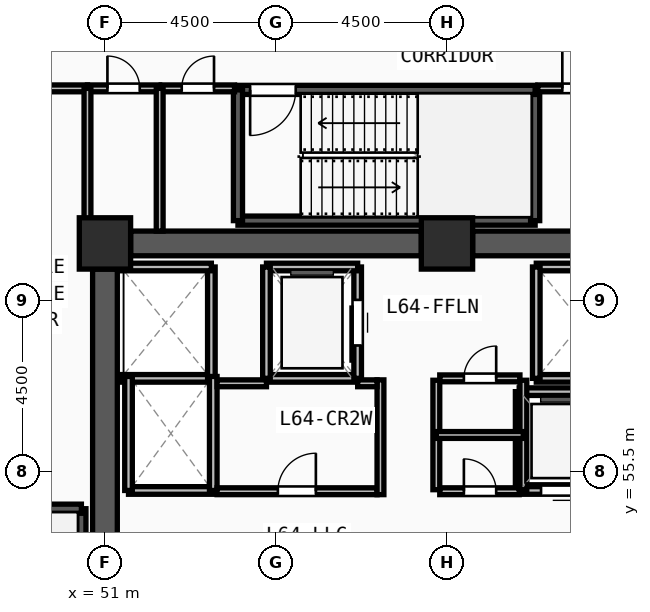
"""IFC4 building model, lengths in metres.
Left out: names, types, materials, properties, quantities, classifications, styles, units other than length and angle.
Written with IfcOpenShell. Run it as: python <this file> out.ifc"""

import sys

from ifc_helpers import new_model, si_unit, direction, frame, frame_2d, origin, origin_2d, place, context, subcontext, project, spatial, rectangle, extrude, source, transform, mapped, element, fill, save


model = new_model("IFC4")
c1 = context("Model", 3, precision=1e-05, world=origin(), true_north=direction((0.0, 1.0)))
c2 = subcontext(c1, "Body", "Model", "MODEL_VIEW")
j1 = project(units=[si_unit("LENGTHUNIT", "METRE"), si_unit("PLANEANGLEUNIT", "RADIAN")], contexts=[c1])
p1 = place(None, origin())
s1 = spatial("IfcSite", under=j1, at=p1, CompositionType="ELEMENT")
p2 = place(p1, origin())
s2 = spatial("IfcBuilding", under=s1, at=p2, CompositionType="ELEMENT")
p3 = place(p2, frame((0.0, 0.0, 247.5)))
s3 = spatial("IfcBuildingStorey", under=s2, at=p3, CompositionType="ELEMENT", Elevation=247.5)
m1 = source(origin(), c2, "Body", "SweptSolid", [
    extrude(rectangle(XDim=1.35, YDim=1.35, at=origin_2d()), origin(), (0.0, 0.0, 1.0), 3.75),
])
for number, where, z_axis, x_axis in (
    (1, (60.0, 61.5, 0.0), (0.0, 0.0, 1.0), (1.0, 0.0, 0.0)),
    (2, (51.0, 61.5, 0.0), (0.0, 0.0, 1.0), (1.0, 0.0, 0.0)),
):
    element("IfcColumn", number, at=place(p3, frame(where, z_axis=z_axis, x_axis=x_axis)), inside=s3, PredefinedType="COLUMN", context=c2, shape_type="MappedRepresentation", body=[
        mapped(m1, transform((0.0, 0.0, 0.0), x_axis=(1.0, 0.0, 0.0), y_axis=(0.0, 1.0, 0.0), z_axis=(0.0, 0.0, 1.0), scale=1.0)),
    ])
for number, where, z_axis, x_axis in (
    (3, (51.675, 61.5, 0.0), (0.0, 0.0, 1.0), (1.0, 0.0, 0.0)),
    (4, (60.675, 61.5, 0.0), (0.0, 0.0, 1.0), (1.0, 0.0, 0.0)),
):
    element("IfcWall", number, at=place(p3, frame(where, z_axis=z_axis, x_axis=x_axis)), inside=s3, PredefinedType="SHEAR", context=c2, shape_type="SweptSolid", body=[
        extrude(rectangle(XDim=7.65, YDim=0.65, at=frame_2d((3.825, 0.0))), origin(), (0.0, 0.0, 1.0), 3.57),
    ])
p4 = place(p3, frame((51.0, 47.175, 0.0), z_axis=(0.0, 0.0, 1.0), x_axis=(0.0, 1.0, 0.0)))
e5 = element("IfcWall", 5, at=p4, inside=s3, PredefinedType="SHEAR", context=c2, shape_type="SweptSolid", body=[
    extrude(rectangle(XDim=13.65, YDim=0.65, at=frame_2d((6.825, 0.0))), origin(), (0.0, 0.0, 1.0), 3.57),
])
p5 = place(p3, frame((50.38, 46.7, 0.0), z_axis=(0.0, 0.0, 1.0), x_axis=(0.0, 1.0, 0.0)))
e6 = element("IfcWall", 6, at=p5, inside=s3, PredefinedType="SOLIDWALL", context=c2, shape_type="SweptSolid", body=[
    extrude(rectangle(XDim=7.82, YDim=0.24, at=frame_2d((3.91, 0.0))), origin(), (0.0, 0.0, 1.0), 3.57),
])
p6 = place(p3, frame((50.38, 54.52, 0.0), z_axis=(0.0, 0.0, 1.0), x_axis=(-1.0, 0.0, 0.0)))
e7 = element("IfcWall", 7, at=p6, inside=s3, PredefinedType="SOLIDWALL", context=c2, shape_type="SweptSolid", body=[
    extrude(rectangle(XDim=3.44, YDim=0.24, at=frame_2d((1.72, 0.0))), origin(), (0.0, 0.0, 1.0), 3.57),
])
p7 = place(p3, frame((54.5, 62.1, 0.0), z_axis=(0.0, 0.0, 1.0), x_axis=(1.0, 0.0, 0.0)))
e8 = element("IfcWall", 8, at=p7, inside=s3, PredefinedType="SOLIDWALL", context=c2, shape_type="SweptSolid", body=[
    extrude(rectangle(XDim=7.82, YDim=0.24, at=frame_2d((3.91, 0.0))), origin(), (0.0, 0.0, 1.0), 3.57),
])
p8 = place(p3, frame((62.32, 62.1, 0.0), z_axis=(0.0, 0.0, 1.0), x_axis=(0.0, 1.0, 0.0)))
e9 = element("IfcWall", 9, at=p8, inside=s3, PredefinedType="SOLIDWALL", context=c2, shape_type="SweptSolid", body=[
    extrude(rectangle(XDim=3.44, YDim=0.24, at=frame_2d((1.72, 0.0))), origin(), (0.0, 0.0, 1.0), 3.57),
])
p9 = place(p3, frame((62.32, 65.54, 0.0), z_axis=(0.0, 0.0, 1.0), x_axis=(-1.0, 0.0, 0.0)))
e10 = element("IfcWall", 10, at=p9, inside=s3, PredefinedType="SOLIDWALL", context=c2, shape_type="SweptSolid", body=[
    extrude(rectangle(XDim=7.82, YDim=0.24, at=frame_2d((3.91, 0.0))), origin(), (0.0, 0.0, 1.0), 3.57),
])
m2 = source(origin(), c2, "Body", "SweptSolid", [
    extrude(rectangle(XDim=1.2, YDim=2.2, at=frame_2d((0.6, 1.1))), frame((0.0, 0.13, 0.0), z_axis=(0.0, -1.0, 0.0), x_axis=(1.0, 0.0, 0.0)), (0.0, 0.0, 1.0), 0.26),
])
p10 = place(p9, frame((6.3, 0.0, 0.0)))
e11 = element("IfcOpeningElement", 11, at=p10, cuts=e10, PredefinedType="OPENING", context=c2, shape_type="MappedRepresentation", body=[
    mapped(m2, transform((0.0, 0.0, 0.0), x_axis=(1.0, 0.0, 0.0), y_axis=(0.0, 1.0, 0.0), z_axis=(0.0, 0.0, 1.0), scale=1.0)),
])
p11 = place(p3, frame((54.5, 65.54, 0.0), z_axis=(0.0, 0.0, 1.0), x_axis=(0.0, -1.0, 0.0)))
e12 = element("IfcWall", 12, at=p11, inside=s3, PredefinedType="SOLIDWALL", context=c2, shape_type="SweptSolid", body=[
    extrude(rectangle(XDim=3.44, YDim=0.24, at=frame_2d((1.72, 0.0))), origin(), (0.0, 0.0, 1.0), 3.57),
])
p12 = place(p3, frame((55.25, 57.95, 0.0), z_axis=(0.0, 0.0, 1.0), x_axis=(1.0, 0.0, 0.0)))
e13 = element("IfcWall", 13, at=p12, inside=s3, PredefinedType="SOLIDWALL", context=c2, shape_type="SweptSolid", body=[
    extrude(rectangle(XDim=2.4, YDim=0.2, at=frame_2d((1.2, 0.0))), origin(), (0.0, 0.0, 1.0), 3.57),
])
p13 = place(p3, frame((57.65, 57.95, 0.0), z_axis=(0.0, 0.0, 1.0), x_axis=(0.0, 1.0, 0.0)))
e14 = element("IfcWall", 14, at=p13, inside=s3, PredefinedType="SOLIDWALL", context=c2, shape_type="SweptSolid", body=[
    extrude(rectangle(XDim=2.93, YDim=0.2, at=frame_2d((1.465, 0.0))), origin(), (0.0, 0.0, 1.0), 3.57),
])
m3 = source(origin(), c2, "Body", "SweptSolid", [
    extrude(rectangle(XDim=1.2, YDim=2.3, at=frame_2d((0.6, 1.15))), frame((0.0, 0.11, 0.0), z_axis=(0.0, -1.0, 0.0), x_axis=(1.0, 0.0, 0.0)), (0.0, 0.0, 1.0), 0.22),
])
p14 = place(p13, frame((0.865, 0.0, 0.0)))
e15 = element("IfcOpeningElement", 15, at=p14, cuts=e14, PredefinedType="OPENING", context=c2, shape_type="MappedRepresentation", body=[
    mapped(m3, transform((0.0, 0.0, 0.0), x_axis=(1.0, 0.0, 0.0), y_axis=(0.0, 1.0, 0.0), z_axis=(0.0, 0.0, 1.0), scale=1.0)),
])
p15 = place(p3, frame((57.65, 60.88, 0.0), z_axis=(0.0, 0.0, 1.0), x_axis=(-1.0, 0.0, 0.0)))
e16 = element("IfcWall", 16, at=p15, inside=s3, PredefinedType="SOLIDWALL", context=c2, shape_type="SweptSolid", body=[
    extrude(rectangle(XDim=2.4, YDim=0.2, at=frame_2d((1.2, 0.0))), origin(), (0.0, 0.0, 1.0), 3.57),
])
p16 = place(p3, frame((55.25, 60.88, 0.0), z_axis=(0.0, 0.0, 1.0), x_axis=(0.0, -1.0, 0.0)))
e17 = element("IfcWall", 17, at=p16, inside=s3, PredefinedType="SOLIDWALL", context=c2, shape_type="SweptSolid", body=[
    extrude(rectangle(XDim=2.93, YDim=0.2, at=frame_2d((1.465, 0.0))), origin(), (0.0, 0.0, 1.0), 3.57),
])
for number, where, z_axis, x_axis in (
    (18, (62.35, 57.95, 0.0), (0.0, 0.0, 1.0), (1.0, 0.0, 0.0)),
    (19, (64.75, 60.88, 0.0), (0.0, 0.0, 1.0), (-1.0, 0.0, 0.0)),
):
    element("IfcWall", number, at=place(p3, frame(where, z_axis=z_axis, x_axis=x_axis)), inside=s3, PredefinedType="SOLIDWALL", context=c2, shape_type="SweptSolid", body=[
        extrude(rectangle(XDim=2.4, YDim=0.2, at=frame_2d((1.2, 0.0))), origin(), (0.0, 0.0, 1.0), 3.57),
    ])
p17 = place(p3, frame((62.35, 60.88, 0.0), z_axis=(0.0, 0.0, 1.0), x_axis=(0.0, -1.0, 0.0)))
e20 = element("IfcWall", 20, at=p17, inside=s3, PredefinedType="SOLIDWALL", context=c2, shape_type="SweptSolid", body=[
    extrude(rectangle(XDim=2.93, YDim=0.2, at=frame_2d((1.465, 0.0))), origin(), (0.0, 0.0, 1.0), 3.57),
])
p18 = place(p3, frame((51.4, 57.95, 0.0), z_axis=(0.0, 0.0, 1.0), x_axis=(1.0, 0.0, 0.0)))
e21 = element("IfcWall", 21, at=p18, inside=s3, PredefinedType="SOLIDWALL", context=c2, shape_type="SweptSolid", body=[
    extrude(rectangle(XDim=2.4, YDim=0.2, at=frame_2d((1.2, 0.0))), origin(), (0.0, 0.0, 1.0), 3.57),
])
p19 = place(p3, frame((53.8, 57.95, 0.0), z_axis=(0.0, 0.0, 1.0), x_axis=(0.0, 1.0, 0.0)))
e22 = element("IfcWall", 22, at=p19, inside=s3, PredefinedType="SOLIDWALL", context=c2, shape_type="SweptSolid", body=[
    extrude(rectangle(XDim=2.93, YDim=0.2, at=frame_2d((1.465, 0.0))), origin(), (0.0, 0.0, 1.0), 3.57),
])
p20 = place(p3, frame((53.8, 60.88, 0.0), z_axis=(0.0, 0.0, 1.0), x_axis=(-1.0, 0.0, 0.0)))
e23 = element("IfcWall", 23, at=p20, inside=s3, PredefinedType="SOLIDWALL", context=c2, shape_type="SweptSolid", body=[
    extrude(rectangle(XDim=2.4, YDim=0.2, at=frame_2d((1.2, 0.0))), origin(), (0.0, 0.0, 1.0), 3.57),
])
p21 = place(p3, frame((51.62, 55.0, 0.0), z_axis=(0.0, 0.0, 1.0), x_axis=(1.0, 0.0, 0.0)))
e24 = element("IfcWall", 24, at=p21, inside=s3, PredefinedType="SOLIDWALL", context=c2, shape_type="SweptSolid", body=[
    extrude(rectangle(XDim=2.23, YDim=0.2, at=frame_2d((1.115, 0.0))), origin(), (0.0, 0.0, 1.0), 3.57),
])
for number, where, z_axis, x_axis in (
    (25, (53.85, 55.0, 0.0), (0.0, 0.0, 1.0), (0.0, 1.0, 0.0)),
    (26, (51.62, 58.0, 0.0), (0.0, 0.0, 1.0), (0.0, -1.0, 0.0)),
):
    element("IfcWall", number, at=place(p3, frame(where, z_axis=z_axis, x_axis=x_axis)), inside=s3, PredefinedType="SOLIDWALL", context=c2, shape_type="SweptSolid", body=[
        extrude(rectangle(XDim=3.0, YDim=0.2, at=frame_2d((1.5, 0.0))), origin(), (0.0, 0.0, 1.0), 3.57),
    ])
p22 = place(p3, frame((61.9, 55.0, 0.0), z_axis=(0.0, 0.0, 1.0), x_axis=(1.0, 0.0, 0.0)))
e27 = element("IfcWall", 27, at=p22, inside=s3, PredefinedType="SOLIDWALL", context=c2, shape_type="SweptSolid", body=[
    extrude(rectangle(XDim=2.25, YDim=0.2, at=frame_2d((1.125, 0.0))), origin(), (0.0, 0.0, 1.0), 3.57),
])
m4 = source(origin(), c2, "Body", "SweptSolid", [
    extrude(rectangle(XDim=1.1, YDim=2.2, at=frame_2d((0.55, 1.1))), frame((0.0, 0.11, 0.0), z_axis=(0.0, -1.0, 0.0), x_axis=(1.0, 0.0, 0.0)), (0.0, 0.0, 1.0), 0.22),
])
p23 = place(p22, frame((0.575, 0.0, 0.0)))
e28 = element("IfcOpeningElement", 28, at=p23, cuts=e27, PredefinedType="OPENING", context=c2, shape_type="MappedRepresentation", body=[
    mapped(m4, transform((0.0, 0.0, 0.0), x_axis=(1.0, 0.0, 0.0), y_axis=(0.0, 1.0, 0.0), z_axis=(0.0, 0.0, 1.0), scale=1.0)),
])
p24 = place(p3, frame((64.15, 57.6, 0.0), z_axis=(0.0, 0.0, 1.0), x_axis=(-1.0, 0.0, 0.0)))
e29 = element("IfcWall", 29, at=p24, inside=s3, PredefinedType="SOLIDWALL", context=c2, shape_type="SweptSolid", body=[
    extrude(rectangle(XDim=2.25, YDim=0.2, at=frame_2d((1.125, 0.0))), origin(), (0.0, 0.0, 1.0), 3.57),
])
p25 = place(p3, frame((61.9, 57.6, 0.0), z_axis=(0.0, 0.0, 1.0), x_axis=(0.0, -1.0, 0.0)))
e30 = element("IfcWall", 30, at=p25, inside=s3, PredefinedType="SOLIDWALL", context=c2, shape_type="SweptSolid", body=[
    extrude(rectangle(XDim=2.6, YDim=0.2, at=frame_2d((1.3, 0.0))), origin(), (0.0, 0.0, 1.0), 3.57),
])
p26 = place(p3, frame((53.95, 54.98, 0.0), z_axis=(0.0, 0.0, 1.0), x_axis=(1.0, 0.0, 0.0)))
e31 = element("IfcWall", 31, at=p26, inside=s3, PredefinedType="PARTITIONING", context=c2, shape_type="SweptSolid", body=[
    extrude(rectangle(XDim=4.21, YDim=0.18, at=frame_2d((2.105, 0.0))), origin(), (0.0, 0.0, 1.0), 3.57),
])
m5 = source(origin(), c2, "Body", "SweptSolid", [
    extrude(rectangle(XDim=1.0, YDim=2.2, at=frame_2d((0.5, 1.1))), frame((0.0, 0.1, 0.0), z_axis=(0.0, -1.0, 0.0), x_axis=(1.0, 0.0, 0.0)), (0.0, 0.0, 1.0), 0.2),
])
p27 = place(p26, frame((1.6, 0.0, 0.0)))
e32 = element("IfcOpeningElement", 32, at=p27, cuts=e31, PredefinedType="OPENING", context=c2, shape_type="MappedRepresentation", body=[
    mapped(m5, transform((0.0, 0.0, 0.0), x_axis=(1.0, 0.0, 0.0), y_axis=(0.0, 1.0, 0.0), z_axis=(0.0, 0.0, 1.0), scale=1.0)),
])
p28 = place(p3, frame((59.81, 54.98, 0.0), z_axis=(0.0, 0.0, 1.0), x_axis=(1.0, 0.0, 0.0)))
e33 = element("IfcWall", 33, at=p28, inside=s3, PredefinedType="PARTITIONING", context=c2, shape_type="SweptSolid", body=[
    extrude(rectangle(XDim=2.09, YDim=0.18, at=frame_2d((1.045, 0.0))), origin(), (0.0, 0.0, 1.0), 3.57),
])
m6 = source(origin(), c2, "Body", "SweptSolid", [
    extrude(rectangle(XDim=0.85, YDim=2.1, at=frame_2d((0.425, 1.05))), frame((0.0, 0.1, 0.0), z_axis=(0.0, -1.0, 0.0), x_axis=(1.0, 0.0, 0.0)), (0.0, 0.0, 1.0), 0.2),
])
p29 = place(p28, frame((0.635, 0.0, 0.0)))
e34 = element("IfcOpeningElement", 34, at=p29, cuts=e33, PredefinedType="OPENING", context=c2, shape_type="MappedRepresentation", body=[
    mapped(m6, transform((0.0, 0.0, 0.0), x_axis=(1.0, 0.0, 0.0), y_axis=(0.0, 1.0, 0.0), z_axis=(0.0, 0.0, 1.0), scale=1.0)),
])
p30 = place(p3, frame((59.81, 57.95, 0.0), z_axis=(0.0, 0.0, 1.0), x_axis=(1.0, 0.0, 0.0)))
e35 = element("IfcWall", 35, at=p30, inside=s3, PredefinedType="PARTITIONING", context=c2, shape_type="SweptSolid", body=[
    extrude(rectangle(XDim=2.11, YDim=0.18, at=frame_2d((1.055, 0.0))), origin(), (0.0, 0.0, 1.0), 3.57),
])
p31 = place(p30, frame((0.635, 0.0, 0.0)))
e36 = element("IfcOpeningElement", 36, at=p31, cuts=e35, PredefinedType="OPENING", context=c2, shape_type="MappedRepresentation", body=[
    mapped(m6, transform((0.0, 0.0, 0.0), x_axis=(1.0, 0.0, 0.0), y_axis=(0.0, 1.0, 0.0), z_axis=(0.0, 0.0, 1.0), scale=1.0)),
])
p32 = place(p3, frame((50.54, 65.58, 0.0), z_axis=(0.0, 0.0, 1.0), x_axis=(1.0, 0.0, 0.0)))
e37 = element("IfcWall", 37, at=p32, inside=s3, PredefinedType="PARTITIONING", context=c2, shape_type="SweptSolid", body=[
    extrude(rectangle(XDim=1.9, YDim=0.18, at=frame_2d((0.95, 0.0))), origin(), (0.0, 0.0, 1.0), 3.57),
])
p33 = place(p32, frame((0.525, 0.0, 0.0)))
e38 = element("IfcOpeningElement", 38, at=p33, cuts=e37, PredefinedType="OPENING", context=c2, shape_type="MappedRepresentation", body=[
    mapped(m6, transform((0.0, 0.0, 0.0), x_axis=(1.0, 0.0, 0.0), y_axis=(0.0, 1.0, 0.0), z_axis=(0.0, 0.0, 1.0), scale=1.0)),
])
p34 = place(p3, frame((52.48, 65.58, 0.0), z_axis=(0.0, 0.0, 1.0), x_axis=(1.0, 0.0, 0.0)))
e39 = element("IfcWall", 39, at=p34, inside=s3, PredefinedType="PARTITIONING", context=c2, shape_type="SweptSolid", body=[
    extrude(rectangle(XDim=1.93, YDim=0.18, at=frame_2d((0.965, 0.0))), origin(), (0.0, 0.0, 1.0), 3.57),
])
p35 = place(p34, frame((0.54, 0.0, 0.0)))
e40 = element("IfcOpeningElement", 40, at=p35, cuts=e39, PredefinedType="OPENING", context=c2, shape_type="MappedRepresentation", body=[
    mapped(m6, transform((0.0, 0.0, 0.0), x_axis=(1.0, 0.0, 0.0), y_axis=(0.0, 1.0, 0.0), z_axis=(0.0, 0.0, 1.0), scale=1.0)),
])
p36 = place(p3, frame((62.39, 65.58, 0.0), z_axis=(0.0, 0.0, 1.0), x_axis=(1.0, 0.0, 0.0)))
e41 = element("IfcWall", 41, at=p36, inside=s3, PredefinedType="PARTITIONING", context=c2, shape_type="SweptSolid", body=[
    extrude(rectangle(XDim=2.29, YDim=0.18, at=frame_2d((1.145, 0.0))), origin(), (0.0, 0.0, 1.0), 3.57),
])
p37 = place(p36, frame((0.645, 0.0, 0.0)))
e42 = element("IfcOpeningElement", 42, at=p37, cuts=e41, PredefinedType="OPENING", context=c2, shape_type="MappedRepresentation", body=[
    mapped(m5, transform((0.0, 0.0, 0.0), x_axis=(1.0, 0.0, 0.0), y_axis=(0.0, 1.0, 0.0), z_axis=(0.0, 0.0, 1.0), scale=1.0)),
])
p38 = place(p3, frame((46.7, 65.58, 0.0), z_axis=(0.0, 0.0, 1.0), x_axis=(1.0, 0.0, 0.0)))
e43 = element("IfcWall", 43, at=p38, inside=s3, PredefinedType="PARTITIONING", context=c2, shape_type="SweptSolid", body=[
    extrude(rectangle(XDim=3.84, YDim=0.18, at=frame_2d((1.92, 0.0))), origin(), (0.0, 0.0, 1.0), 3.57),
])
m7 = source(origin(), c2, "Body", "SweptSolid", [
    extrude(rectangle(XDim=1.3, YDim=2.2, at=frame_2d((0.65, 1.1))), frame((0.0, 0.1, 0.0), z_axis=(0.0, -1.0, 0.0), x_axis=(1.0, 0.0, 0.0)), (0.0, 0.0, 1.0), 0.2),
])
p39 = place(p38, frame((1.27, 0.0, 0.0)))
e44 = element("IfcOpeningElement", 44, at=p39, cuts=e43, PredefinedType="OPENING", context=c2, shape_type="MappedRepresentation", body=[
    mapped(m7, transform((0.0, 0.0, 0.0), x_axis=(1.0, 0.0, 0.0), y_axis=(0.0, 1.0, 0.0), z_axis=(0.0, 0.0, 1.0), scale=1.0)),
])
for number, where, z_axis, x_axis in (
    (45, (59.72, 55.02, 0.0), (0.0, 0.0, 1.0), (0.0, 1.0, 0.0)),
    (46, (62.01, 55.02, 0.0), (0.0, 0.0, 1.0), (0.0, 1.0, 0.0)),
):
    element("IfcWall", number, at=place(p3, frame(where, z_axis=z_axis, x_axis=x_axis)), inside=s3, PredefinedType="PARTITIONING", context=c2, shape_type="SweptSolid", body=[
        extrude(rectangle(XDim=2.88, YDim=0.18, at=frame_2d((1.44, 0.0))), origin(), (0.0, 0.0, 1.0), 3.57),
    ])
p40 = place(p3, frame((59.72, 56.46, 0.0), z_axis=(0.0, 0.0, 1.0), x_axis=(1.0, 0.0, 0.0)))
e47 = element("IfcWall", 47, at=p40, inside=s3, PredefinedType="PARTITIONING", context=c2, shape_type="SweptSolid", body=[
    extrude(rectangle(XDim=2.29, YDim=0.18, at=frame_2d((1.145, 0.0))), origin(), (0.0, 0.0, 1.0), 3.57),
])
p41 = place(p3, frame((50.54, 61.95, 0.0), z_axis=(0.0, 0.0, 1.0), x_axis=(0.0, 1.0, 0.0)))
e48 = element("IfcWall", 48, at=p41, inside=s3, PredefinedType="PARTITIONING", context=c2, shape_type="SweptSolid", body=[
    extrude(rectangle(XDim=3.63, YDim=0.18, at=frame_2d((1.815, 0.0))), origin(), (0.0, 0.0, 1.0), 3.57),
])
p42 = place(p3, frame((52.44, 61.825, 0.0), z_axis=(0.0, 0.0, 1.0), x_axis=(0.0, 1.0, 0.0)))
e49 = element("IfcWall", 49, at=p42, inside=s3, PredefinedType="PARTITIONING", context=c2, shape_type="SweptSolid", body=[
    extrude(rectangle(XDim=3.755, YDim=0.18, at=frame_2d((1.877, 0.0))), origin(), (0.0, 0.0, 1.0), 3.57),
])
p43 = place(p3, frame((58.25, 54.89, 0.0), z_axis=(0.0, 0.0, 1.0), x_axis=(0.0, 1.0, 0.0)))
e50 = element("IfcWall", 50, at=p43, inside=s3, PredefinedType="PARTITIONING", context=c2, shape_type="SweptSolid", body=[
    extrude(rectangle(XDim=3.02, YDim=0.18, at=frame_2d((1.51, 0.0))), origin(), (0.0, 0.0, 1.0), 3.57),
])
p44 = place(p3, frame((53.95, 57.82, 0.0), z_axis=(0.0, 0.0, 1.0), x_axis=(1.0, 0.0, 0.0)))
e51 = element("IfcWall", 51, at=p44, inside=s3, PredefinedType="PARTITIONING", context=c2, shape_type="SweptSolid", body=[
    extrude(rectangle(XDim=1.3, YDim=0.18, at=frame_2d((0.65, 0.0))), origin(), (0.0, 0.0, 1.0), 3.57),
])
p45 = place(p3, frame((57.65, 57.82, 0.0), z_axis=(0.0, 0.0, 1.0), x_axis=(1.0, 0.0, 0.0)))
e52 = element("IfcWall", 52, at=p45, inside=s3, PredefinedType="PARTITIONING", context=c2, shape_type="SweptSolid", body=[
    extrude(rectangle(XDim=0.51, YDim=0.18, at=frame_2d((0.255, 0.0))), origin(), (0.0, 0.0, 1.0), 3.57),
])
m8 = source(origin(), c2, "Body", "SweptSolid", [
    extrude(rectangle(XDim=1.2, YDim=2.2, at=frame_2d((0.6, 1.1))), frame((0.0, 0.025, 0.0), z_axis=(0.0, -1.0, 0.0), x_axis=(1.0, 0.0, 0.0)), (0.0, 0.0, 1.0), 0.05),
])
p46 = place(p10, origin())
e53 = element("IfcDoor", 53, at=p46, inside=s3, OperationType="SINGLE_SWING_RIGHT", PredefinedType="DOOR", context=c2, shape_type="MappedRepresentation", body=[
    mapped(m8, transform((0.0, 0.0, 0.0), x_axis=(1.0, 0.0, 0.0), y_axis=(0.0, 1.0, 0.0), z_axis=(0.0, 0.0, 1.0), scale=1.0)),
])
fill(e11, e53)
m9 = source(origin(), c2, "Body", "SweptSolid", [
    extrude(rectangle(XDim=1.2, YDim=2.3, at=frame_2d((0.6, 1.15))), frame((0.0, 0.025, 0.0), z_axis=(0.0, -1.0, 0.0), x_axis=(1.0, 0.0, 0.0)), (0.0, 0.0, 1.0), 0.05),
])
p47 = place(p14, origin())
e54 = element("IfcDoor", 54, at=p47, inside=s3, OperationType="SLIDING_TO_LEFT", PredefinedType="DOOR", context=c2, shape_type="MappedRepresentation", body=[
    mapped(m9, transform((0.0, 0.0, 0.0), x_axis=(1.0, 0.0, 0.0), y_axis=(0.0, 1.0, 0.0), z_axis=(0.0, 0.0, 1.0), scale=1.0)),
])
fill(e15, e54)
m10 = source(origin(), c2, "Body", "SweptSolid", [
    extrude(rectangle(XDim=1.1, YDim=2.2, at=frame_2d((0.55, 1.1))), frame((0.0, 0.025, 0.0), z_axis=(0.0, -1.0, 0.0), x_axis=(1.0, 0.0, 0.0)), (0.0, 0.0, 1.0), 0.05),
])
p48 = place(p23, origin())
e55 = element("IfcDoor", 55, at=p48, inside=s3, OperationType="SLIDING_TO_LEFT", PredefinedType="DOOR", context=c2, shape_type="MappedRepresentation", body=[
    mapped(m10, transform((0.0, 0.0, 0.0), x_axis=(1.0, 0.0, 0.0), y_axis=(0.0, 1.0, 0.0), z_axis=(0.0, 0.0, 1.0), scale=1.0)),
])
fill(e28, e55)
m11 = source(origin(), c2, "Body", "SweptSolid", [
    extrude(rectangle(XDim=1.0, YDim=2.2, at=frame_2d((0.5, 1.1))), frame((0.0, 0.025, 0.0), z_axis=(0.0, -1.0, 0.0), x_axis=(1.0, 0.0, 0.0)), (0.0, 0.0, 1.0), 0.05),
])
p49 = place(p27, origin())
e56 = element("IfcDoor", 56, at=p49, inside=s3, OperationType="SINGLE_SWING_RIGHT", PredefinedType="DOOR", context=c2, shape_type="MappedRepresentation", body=[
    mapped(m11, transform((0.0, 0.0, 0.0), x_axis=(1.0, 0.0, 0.0), y_axis=(0.0, 1.0, 0.0), z_axis=(0.0, 0.0, 1.0), scale=1.0)),
])
fill(e32, e56)
m12 = source(origin(), c2, "Body", "SweptSolid", [
    extrude(rectangle(XDim=0.85, YDim=2.1, at=frame_2d((0.425, 1.05))), frame((0.0, 0.025, 0.0), z_axis=(0.0, -1.0, 0.0), x_axis=(1.0, 0.0, 0.0)), (0.0, 0.0, 1.0), 0.05),
])
p50 = place(p29, origin())
e57 = element("IfcDoor", 57, at=p50, inside=s3, OperationType="SINGLE_SWING_LEFT", PredefinedType="DOOR", context=c2, shape_type="MappedRepresentation", body=[
    mapped(m12, transform((0.0, 0.0, 0.0), x_axis=(1.0, 0.0, 0.0), y_axis=(0.0, 1.0, 0.0), z_axis=(0.0, 0.0, 1.0), scale=1.0)),
])
fill(e34, e57)
p51 = place(p31, origin())
e58 = element("IfcDoor", 58, at=p51, inside=s3, OperationType="SINGLE_SWING_RIGHT", PredefinedType="DOOR", context=c2, shape_type="MappedRepresentation", body=[
    mapped(m12, transform((0.0, 0.0, 0.0), x_axis=(1.0, 0.0, 0.0), y_axis=(0.0, 1.0, 0.0), z_axis=(0.0, 0.0, 1.0), scale=1.0)),
])
fill(e36, e58)
p52 = place(p33, origin())
e59 = element("IfcDoor", 59, at=p52, inside=s3, OperationType="SINGLE_SWING_LEFT", PredefinedType="DOOR", context=c2, shape_type="MappedRepresentation", body=[
    mapped(m12, transform((0.0, 0.0, 0.0), x_axis=(1.0, 0.0, 0.0), y_axis=(0.0, 1.0, 0.0), z_axis=(0.0, 0.0, 1.0), scale=1.0)),
])
fill(e38, e59)
p53 = place(p35, origin())
e60 = element("IfcDoor", 60, at=p53, inside=s3, OperationType="SINGLE_SWING_RIGHT", PredefinedType="DOOR", context=c2, shape_type="MappedRepresentation", body=[
    mapped(m12, transform((0.0, 0.0, 0.0), x_axis=(1.0, 0.0, 0.0), y_axis=(0.0, 1.0, 0.0), z_axis=(0.0, 0.0, 1.0), scale=1.0)),
])
fill(e40, e60)
p54 = place(p37, origin())
e61 = element("IfcDoor", 61, at=p54, inside=s3, OperationType="SINGLE_SWING_LEFT", PredefinedType="DOOR", context=c2, shape_type="MappedRepresentation", body=[
    mapped(m11, transform((0.0, 0.0, 0.0), x_axis=(1.0, 0.0, 0.0), y_axis=(0.0, 1.0, 0.0), z_axis=(0.0, 0.0, 1.0), scale=1.0)),
])
fill(e42, e61)
save(model, sys.argv[1])
